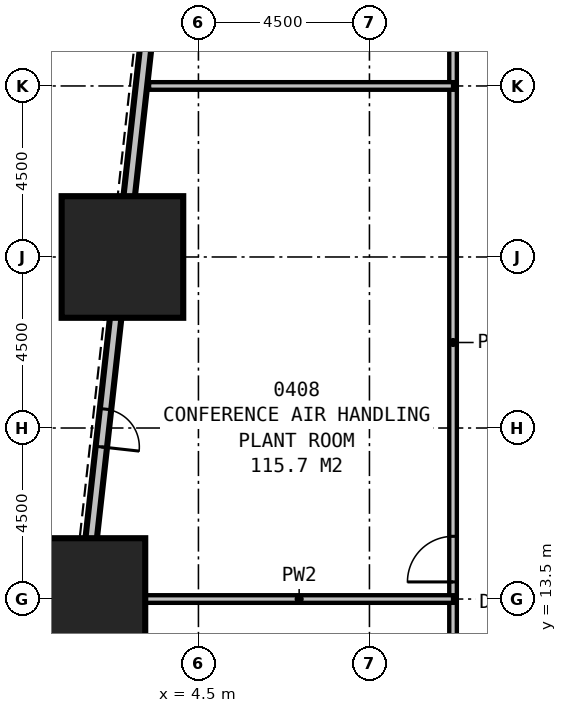
"""IFC4 building model, lengths in metres.
Left out: names, types, materials, properties, quantities, classifications, styles, units other than length and angle.
Written with IfcOpenShell. Run it as: python <this file> out.ifc"""

import sys

from ifc_helpers import new_model, si_unit, direction, frame, frame_2d, origin, origin_2d, place, context, subcontext, project, spatial, rectangle, extrude, element, fill, save


model = new_model("IFC4")
c1 = context("Model", 3, precision=1e-05, world=origin(), true_north=direction((0.0, 1.0)))
c2 = subcontext(c1, "Body", "Model", "MODEL_VIEW")
j1 = project(units=[si_unit("LENGTHUNIT", "METRE"), si_unit("PLANEANGLEUNIT", "RADIAN")], contexts=[c1])
p1 = place(None, origin())
s1 = spatial("IfcSite", under=j1, at=p1, CompositionType="ELEMENT")
p2 = place(p1, origin())
s2 = spatial("IfcBuilding", under=s1, at=p2, CompositionType="ELEMENT")
p3 = place(p2, frame((0.0, 0.0, 24.0)))
s3 = spatial("IfcBuildingStorey", under=s2, at=p3, CompositionType="ELEMENT", Elevation=24.0)
for number, where, z_axis, x_axis in (
    (1, (2.5, 22.5, 0.0), (0.0, 0.0, 1.0), (1.0, 0.0, 0.0)),
    (2, (1.5, 13.5, 0.0), (0.0, 0.0, 1.0), (1.0, 0.0, 0.0)),
):
    element("IfcColumn", number, at=place(p3, frame(where, z_axis=z_axis, x_axis=x_axis)), inside=s3, PredefinedType="COLUMN", context=c2, shape_type="SweptSolid", body=[
        extrude(rectangle(XDim=3.2, YDim=3.2, at=origin_2d()), origin(), (0.0, 0.0, 1.0), 5.7),
    ])
p4 = place(p3, frame((4.017, 36.149, 0.0), z_axis=(0.0, 0.0, 1.0), x_axis=(-0.110433201132, -0.993883548555, 0.0)))
e3 = element("IfcWall", 3, at=p4, inside=s3, PredefinedType="STANDARD", context=c2, shape_type="SweptSolid", body=[
    extrude(rectangle(XDim=31.994, YDim=0.3, at=frame_2d((15.997, 0.0))), origin(), (0.0, 0.0, 1.0), 2.85),
])
p5 = place(p4, frame((17.761, 0.0, 0.0)))
e4 = element("IfcOpeningElement", 4, at=p5, cuts=e3, PredefinedType="OPENING", context=c2, shape_type="SweptSolid", body=[
    extrude(rectangle(XDim=1.0, YDim=2.1, at=frame_2d((0.5, 1.05))), frame((0.0, 0.16, 0.0), z_axis=(0.0, -1.0, 0.0), x_axis=(1.0, 0.0, 0.0)), (0.0, 0.0, 1.0), 0.32),
])
p6 = place(p4, frame((26.116, 0.0, 0.5)))
e5 = element("IfcOpeningElement", 5, at=p6, cuts=e3, PredefinedType="OPENING", context=c2, shape_type="SweptSolid", body=[
    extrude(rectangle(XDim=2.4, YDim=2.0, at=frame_2d((1.2, 1.0))), frame((0.0, 0.16, 0.0), z_axis=(0.0, -1.0, 0.0), x_axis=(1.0, 0.0, 0.0)), (0.0, 0.0, 1.0), 0.32),
])
p7 = place(p3, frame((11.2, 11.2, 0.0), z_axis=(0.0, 0.0, 1.0), x_axis=(0.0, 1.0, 0.0)))
e6 = element("IfcWall", 6, at=p7, inside=s3, PredefinedType="PARTITIONING", context=c2, shape_type="SweptSolid", body=[
    extrude(rectangle(XDim=18.1, YDim=0.2, at=frame_2d((9.05, 0.0))), origin(), (0.0, 0.0, 1.0), 5.45),
])
p8 = place(p7, frame((2.75, 0.0, 0.0)))
e7 = element("IfcOpeningElement", 7, at=p8, cuts=e6, PredefinedType="OPENING", context=c2, shape_type="SweptSolid", body=[
    extrude(rectangle(XDim=1.2, YDim=2.1, at=frame_2d((0.6, 1.05))), frame((0.0, 0.11, 0.0), z_axis=(0.0, -1.0, 0.0), x_axis=(1.0, 0.0, 0.0)), (0.0, 0.0, 1.0), 0.22),
])
p9 = place(p3, frame((11.2, 13.5, 0.0), z_axis=(0.0, 0.0, 1.0), x_axis=(-1.0, 0.0, 0.0)))
e8 = element("IfcWall", 8, at=p9, inside=s3, PredefinedType="PARTITIONING", context=c2, shape_type="SweptSolid", body=[
    extrude(rectangle(XDim=8.099, YDim=0.2, at=frame_2d((4.05, 0.0))), origin(), (0.0, 0.0, 1.0), 4.15),
])
p10 = place(p3, frame((11.2, 27.0, 0.0), z_axis=(0.0, 0.0, 1.0), x_axis=(-1.0, 0.0, 0.0)))
e9 = element("IfcWall", 9, at=p10, inside=s3, PredefinedType="PARTITIONING", context=c2, shape_type="SweptSolid", body=[
    extrude(rectangle(XDim=7.999, YDim=0.2, at=frame_2d((4.0, 0.0))), origin(), (0.0, 0.0, 1.0), 4.15),
])
p11 = place(p5, origin())
e10 = element("IfcDoor", 10, at=p11, inside=s3, OperationType="SINGLE_SWING_RIGHT", PredefinedType="DOOR", context=c2, shape_type="SweptSolid", body=[
    extrude(rectangle(XDim=1.0, YDim=2.1, at=frame_2d((0.5, 1.05))), frame((0.0, 0.025, 0.0), z_axis=(0.0, -1.0, 0.0), x_axis=(1.0, 0.0, 0.0)), (0.0, 0.0, 1.0), 0.05),
])
fill(e4, e10)
p12 = place(p8, origin())
e11 = element("IfcDoor", 11, at=p12, inside=s3, OperationType="SINGLE_SWING_LEFT", PredefinedType="DOOR", context=c2, shape_type="SweptSolid", body=[
    extrude(rectangle(XDim=1.2, YDim=2.1, at=frame_2d((0.6, 1.05))), frame((0.0, 0.025, 0.0), z_axis=(0.0, -1.0, 0.0), x_axis=(1.0, 0.0, 0.0)), (0.0, 0.0, 1.0), 0.05),
])
fill(e7, e11)
save(model, sys.argv[1])
